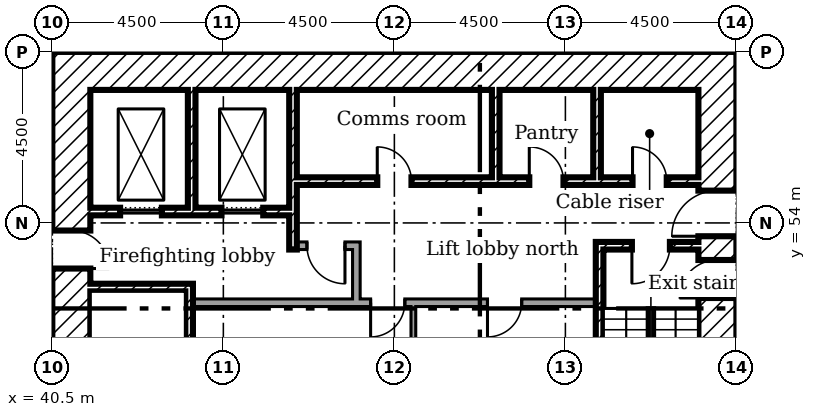
"""IFC4 building model, lengths in metres.
Left out: names, types, materials, properties, quantities, classifications, styles, units other than length and angle.
Written with IfcOpenShell. Run it as: python <this file> out.ifc"""

import sys

from ifc_helpers import new_model, si_unit, direction, frame, frame_2d, origin, place, context, subcontext, project, spatial, rectangle, extrude, element, fill, save


model = new_model("IFC4")
c1 = context("Model", 3, precision=1e-05, world=origin(), true_north=direction((0.0, 1.0)))
c2 = subcontext(c1, "Body", "Model", "MODEL_VIEW")
j1 = project(units=[si_unit("LENGTHUNIT", "METRE"), si_unit("PLANEANGLEUNIT", "RADIAN")], contexts=[c1])
p1 = place(None, origin())
s1 = spatial("IfcSite", under=j1, at=p1, CompositionType="ELEMENT")
p2 = place(p1, origin())
s2 = spatial("IfcBuilding", under=s1, at=p2, CompositionType="ELEMENT")
p3 = place(p2, frame((0.0, 0.0, 11.5)))
s3 = spatial("IfcBuildingStorey", under=s2, at=p3, CompositionType="ELEMENT", Elevation=11.5)
p4 = place(p3, frame((58.0, 40.5, 0.0), z_axis=(0.0, 0.0, 1.0), x_axis=(0.0, 1.0, 0.0)))
e1 = element("IfcWall", 1, at=p4, inside=s3, PredefinedType="SHEAR", context=c2, shape_type="SweptSolid", body=[
    extrude(rectangle(XDim=18.0, YDim=1.0, at=frame_2d((9.0, 0.0))), origin(), (0.0, 0.0, 1.0), 4.5),
])
p5 = place(p4, frame((13.15, 0.0, 0.0)))
e2 = element("IfcOpeningElement", 2, at=p5, cuts=e1, PredefinedType="OPENING", context=c2, shape_type="SweptSolid", body=[
    extrude(rectangle(XDim=1.2, YDim=2.1, at=frame_2d((0.6, 1.05))), frame((0.0, 0.51, 0.0), z_axis=(0.0, -1.0, 0.0), x_axis=(1.0, 0.0, 0.0)), (0.0, 0.0, 1.0), 1.02),
])
p6 = place(p4, frame((3.9, 0.0, 0.0)))
e3 = element("IfcOpeningElement", 3, at=p6, cuts=e1, PredefinedType="OPENING", context=c2, shape_type="SweptSolid", body=[
    extrude(rectangle(XDim=1.8, YDim=2.1, at=frame_2d((0.9, 1.05))), frame((0.0, 0.51, 0.0), z_axis=(0.0, -1.0, 0.0), x_axis=(1.0, 0.0, 0.0)), (0.0, 0.0, 1.0), 1.02),
])
p7 = place(p4, frame((11.525, 0.0, 0.0)))
e4 = element("IfcOpeningElement", 4, at=p7, cuts=e1, PredefinedType="OPENING", context=c2, shape_type="SweptSolid", body=[
    extrude(rectangle(XDim=1.0, YDim=2.1, at=frame_2d((0.5, 1.05))), frame((0.0, 0.51, 0.0), z_axis=(0.0, -1.0, 0.0), x_axis=(1.0, 0.0, 0.0)), (0.0, 0.0, 1.0), 1.02),
])
p8 = place(p3, frame((41.5, 58.0, 0.0)))
e5 = element("IfcWall", 5, at=p8, inside=s3, PredefinedType="SHEAR", context=c2, shape_type="SweptSolid", body=[
    extrude(rectangle(XDim=16.0, YDim=1.0, at=frame_2d((8.0, 0.0))), origin(), (0.0, 0.0, 1.0), 4.5),
])
p9 = place(p3, frame((41.0, 40.5, 0.0), z_axis=(0.0, 0.0, 1.0), x_axis=(0.0, 1.0, 0.0)))
e6 = element("IfcWall", 6, at=p9, inside=s3, PredefinedType="SHEAR", context=c2, shape_type="SweptSolid", body=[
    extrude(rectangle(XDim=18.0, YDim=1.0, at=frame_2d((9.0, 0.0))), origin(), (0.0, 0.0, 1.0), 4.5),
])
p10 = place(p9, frame((3.65, 0.0, 0.0)))
e7 = element("IfcOpeningElement", 7, at=p10, cuts=e6, PredefinedType="OPENING", context=c2, shape_type="SweptSolid", body=[
    extrude(rectangle(XDim=1.2, YDim=2.1, at=frame_2d((0.6, 1.05))), frame((0.0, 0.51, 0.0), z_axis=(0.0, -1.0, 0.0), x_axis=(1.0, 0.0, 0.0)), (0.0, 0.0, 1.0), 1.02),
])
p11 = place(p9, frame((5.475, 0.0, 0.0)))
e8 = element("IfcOpeningElement", 8, at=p11, cuts=e6, PredefinedType="OPENING", context=c2, shape_type="SweptSolid", body=[
    extrude(rectangle(XDim=1.0, YDim=2.1, at=frame_2d((0.5, 1.05))), frame((0.0, 0.51, 0.0), z_axis=(0.0, -1.0, 0.0), x_axis=(1.0, 0.0, 0.0)), (0.0, 0.0, 1.0), 1.02),
])
p12 = place(p9, frame((12.3, 0.0, 0.0)))
e9 = element("IfcOpeningElement", 9, at=p12, cuts=e6, PredefinedType="OPENING", context=c2, shape_type="SweptSolid", body=[
    extrude(rectangle(XDim=1.0, YDim=2.1, at=frame_2d((0.5, 1.05))), frame((0.0, 0.51, 0.0), z_axis=(0.0, -1.0, 0.0), x_axis=(1.0, 0.0, 0.0)), (0.0, 0.0, 1.0), 1.02),
])
p13 = place(p3, frame((44.167, 57.5, 0.0), z_axis=(0.0, 0.0, 1.0), x_axis=(0.0, -1.0, 0.0)))
e10 = element("IfcWall", 10, at=p13, inside=s3, PredefinedType="SHEAR", context=c2, shape_type="SweptSolid", body=[
    extrude(rectangle(XDim=3.1, YDim=0.2, at=frame_2d((1.55, 0.0))), origin(), (0.0, 0.0, 1.0), 4.5),
])
p14 = place(p3, frame((46.833, 57.5, 0.0), z_axis=(0.0, 0.0, 1.0), x_axis=(0.0, -1.0, 0.0)))
e11 = element("IfcWall", 11, at=p14, inside=s3, PredefinedType="SHEAR", context=c2, shape_type="SweptSolid", body=[
    extrude(rectangle(XDim=4.2, YDim=0.2, at=frame_2d((2.1, 0.0))), origin(), (0.0, 0.0, 1.0), 4.5),
])
for number, where, z_axis, x_axis in (
    (12, (52.167, 57.5, 0.0), (0.0, 0.0, 1.0), (0.0, -1.0, 0.0)),
    (13, (54.833, 57.5, 0.0), (0.0, 0.0, 1.0), (0.0, -1.0, 0.0)),
):
    element("IfcWall", number, at=place(p3, frame(where, z_axis=z_axis, x_axis=x_axis)), inside=s3, PredefinedType="SHEAR", context=c2, shape_type="SweptSolid", body=[
        extrude(rectangle(XDim=2.3, YDim=0.2, at=frame_2d((1.15, 0.0))), origin(), (0.0, 0.0, 1.0), 4.5),
    ])
p15 = place(p3, frame((48.5, 51.9, 0.0), z_axis=(0.0, 0.0, 1.0), x_axis=(0.0, 1.0, 0.0)))
e14 = element("IfcWall", 14, at=p15, inside=s3, PredefinedType="PARTITIONING", context=c2, shape_type="SweptSolid", body=[
    extrude(rectangle(XDim=1.6, YDim=0.2, at=frame_2d((0.8, 0.0))), origin(), (0.0, 0.0, 1.0), 4.5),
])
p16 = place(p3, frame((46.933, 53.4, 0.0)))
e15 = element("IfcWall", 15, at=p16, inside=s3, PredefinedType="PARTITIONING", context=c2, shape_type="SweptSolid", body=[
    extrude(rectangle(XDim=1.467, YDim=0.2, at=frame_2d((0.733, 0.0))), origin(), (0.0, 0.0, 1.0), 4.5),
])
p17 = place(p16, frame((0.267, 0.0, 0.0)))
e16 = element("IfcOpeningElement", 16, at=p17, cuts=e15, PredefinedType="OPENING", context=c2, shape_type="SweptSolid", body=[
    extrude(rectangle(XDim=1.0, YDim=2.1, at=frame_2d((0.5, 1.05))), frame((0.0, 0.11, 0.0), z_axis=(0.0, -1.0, 0.0), x_axis=(1.0, 0.0, 0.0)), (0.0, 0.0, 1.0), 0.22),
])
p18 = place(p3, frame((46.933, 55.1, 0.0)))
e17 = element("IfcWall", 17, at=p18, inside=s3, PredefinedType="SHEAR", context=c2, shape_type="SweptSolid", body=[
    extrude(rectangle(XDim=10.567, YDim=0.2, at=frame_2d((5.283, 0.0))), origin(), (0.0, 0.0, 1.0), 4.5),
])
p19 = place(p18, frame((8.833, 0.0, 0.0)))
e18 = element("IfcOpeningElement", 18, at=p19, cuts=e17, PredefinedType="OPENING", context=c2, shape_type="SweptSolid", body=[
    extrude(rectangle(XDim=0.9, YDim=2.1, at=frame_2d((0.45, 1.05))), frame((0.0, 0.11, 0.0), z_axis=(0.0, -1.0, 0.0), x_axis=(1.0, 0.0, 0.0)), (0.0, 0.0, 1.0), 0.22),
])
p20 = place(p18, frame((2.117, 0.0, 0.0)))
e19 = element("IfcOpeningElement", 19, at=p20, cuts=e17, PredefinedType="OPENING", context=c2, shape_type="SweptSolid", body=[
    extrude(rectangle(XDim=0.9, YDim=2.1, at=frame_2d((0.45, 1.05))), frame((0.0, 0.11, 0.0), z_axis=(0.0, -1.0, 0.0), x_axis=(1.0, 0.0, 0.0)), (0.0, 0.0, 1.0), 0.22),
])
p21 = place(p18, frame((6.117, 0.0, 0.0)))
e20 = element("IfcOpeningElement", 20, at=p21, cuts=e17, PredefinedType="OPENING", context=c2, shape_type="SweptSolid", body=[
    extrude(rectangle(XDim=0.9, YDim=2.1, at=frame_2d((0.45, 1.05))), frame((0.0, 0.11, 0.0), z_axis=(0.0, -1.0, 0.0), x_axis=(1.0, 0.0, 0.0)), (0.0, 0.0, 1.0), 0.22),
])
p22 = place(p3, frame((41.5, 54.3, 0.0)))
e21 = element("IfcWall", 21, at=p22, inside=s3, PredefinedType="SHEAR", context=c2, shape_type="SweptSolid", body=[
    extrude(rectangle(XDim=5.233, YDim=0.2, at=frame_2d((2.617, 0.0))), origin(), (0.0, 0.0, 1.0), 4.5),
])
p23 = place(p22, frame((0.783, 0.0, 0.0)))
e22 = element("IfcOpeningElement", 22, at=p23, cuts=e21, PredefinedType="OPENING", context=c2, shape_type="SweptSolid", body=[
    extrude(rectangle(XDim=1.1, YDim=2.1, at=frame_2d((0.55, 1.05))), frame((0.0, 0.11, 0.0), z_axis=(0.0, -1.0, 0.0), x_axis=(1.0, 0.0, 0.0)), (0.0, 0.0, 1.0), 0.22),
])
p24 = place(p22, frame((3.45, 0.0, 0.0)))
e23 = element("IfcOpeningElement", 23, at=p24, cuts=e21, PredefinedType="OPENING", context=c2, shape_type="SweptSolid", body=[
    extrude(rectangle(XDim=1.1, YDim=2.1, at=frame_2d((0.55, 1.05))), frame((0.0, 0.11, 0.0), z_axis=(0.0, -1.0, 0.0), x_axis=(1.0, 0.0, 0.0)), (0.0, 0.0, 1.0), 0.22),
])
p25 = place(p3, frame((44.1, 45.5, 0.0), z_axis=(0.0, 0.0, 1.0), x_axis=(0.0, 1.0, 0.0)))
e24 = element("IfcWall", 24, at=p25, inside=s3, PredefinedType="SHEAR", context=c2, shape_type="SweptSolid", body=[
    extrude(rectangle(XDim=6.9, YDim=0.2, at=frame_2d((3.45, 0.0))), origin(), (0.0, 0.0, 1.0), 4.5),
])
p26 = place(p3, frame((41.5, 52.3, 0.0)))
e25 = element("IfcWall", 25, at=p26, inside=s3, PredefinedType="SHEAR", context=c2, shape_type="SweptSolid", body=[
    extrude(rectangle(XDim=2.5, YDim=0.2, at=frame_2d((1.25, 0.0))), origin(), (0.0, 0.0, 1.0), 4.5),
])
p27 = place(p3, frame((54.8, 53.4, 0.0)))
e26 = element("IfcWall", 26, at=p27, inside=s3, PredefinedType="SHEAR", context=c2, shape_type="SweptSolid", body=[
    extrude(rectangle(XDim=2.7, YDim=0.2, at=frame_2d((1.35, 0.0))), origin(), (0.0, 0.0, 1.0), 4.5),
])
p28 = place(p27, frame((0.95, 0.0, 0.0)))
e27 = element("IfcOpeningElement", 27, at=p28, cuts=e26, PredefinedType="OPENING", context=c2, shape_type="SweptSolid", body=[
    extrude(rectangle(XDim=1.0, YDim=2.1, at=frame_2d((0.5, 1.05))), frame((0.0, 0.11, 0.0), z_axis=(0.0, -1.0, 0.0), x_axis=(1.0, 0.0, 0.0)), (0.0, 0.0, 1.0), 0.22),
])
p29 = place(p3, frame((54.9, 46.8, 0.0), z_axis=(0.0, 0.0, 1.0), x_axis=(0.0, 1.0, 0.0)))
e28 = element("IfcWall", 28, at=p29, inside=s3, PredefinedType="SHEAR", context=c2, shape_type="SweptSolid", body=[
    extrude(rectangle(XDim=6.5, YDim=0.2, at=frame_2d((3.25, 0.0))), origin(), (0.0, 0.0, 1.0), 4.5),
])
p30 = place(p3, frame((44.2, 51.9, 0.0)))
e29 = element("IfcWall", 29, at=p30, inside=s3, PredefinedType="PARTITIONING", context=c2, shape_type="SweptSolid", body=[
    extrude(rectangle(XDim=10.6, YDim=0.2, at=frame_2d((5.3, 0.0))), origin(), (0.0, 0.0, 1.0), 4.5),
])
p31 = place(p30, frame((4.675, 0.0, 0.0)))
e30 = element("IfcOpeningElement", 30, at=p31, cuts=e29, PredefinedType="OPENING", context=c2, shape_type="SweptSolid", body=[
    extrude(rectangle(XDim=0.9, YDim=2.1, at=frame_2d((0.45, 1.05))), frame((0.0, 0.11, 0.0), z_axis=(0.0, -1.0, 0.0), x_axis=(1.0, 0.0, 0.0)), (0.0, 0.0, 1.0), 0.22),
])
p32 = place(p30, frame((7.75, 0.0, 0.0)))
e31 = element("IfcOpeningElement", 31, at=p32, cuts=e29, PredefinedType="OPENING", context=c2, shape_type="SweptSolid", body=[
    extrude(rectangle(XDim=0.9, YDim=2.1, at=frame_2d((0.45, 1.05))), frame((0.0, 0.11, 0.0), z_axis=(0.0, -1.0, 0.0), x_axis=(1.0, 0.0, 0.0)), (0.0, 0.0, 1.0), 0.22),
])
p33 = place(p3, frame((50.0, 49.163, 0.0), z_axis=(0.0, 0.0, 1.0), x_axis=(0.0, 1.0, 0.0)))
e32 = element("IfcWall", 32, at=p33, inside=s3, PredefinedType="PARTITIONING", context=c2, shape_type="SweptSolid", body=[
    extrude(rectangle(XDim=2.637, YDim=0.125, at=frame_2d((1.319, 0.0))), origin(), (0.0, 0.0, 1.0), 4.5),
])
p34 = place(p5, origin())
e33 = element("IfcDoor", 33, at=p34, inside=s3, OperationType="SINGLE_SWING_RIGHT", PredefinedType="DOOR", context=c2, shape_type="SweptSolid", body=[
    extrude(rectangle(XDim=1.2, YDim=2.1, at=frame_2d((0.6, 1.05))), frame((0.0, 0.025, 0.0), z_axis=(0.0, -1.0, 0.0), x_axis=(1.0, 0.0, 0.0)), (0.0, 0.0, 1.0), 0.05),
])
fill(e2, e33)
p35 = place(p28, frame((1.0, 0.0, 0.0), x_axis=(-1.0, 0.0, 0.0)))
e34 = element("IfcDoor", 34, at=p35, inside=s3, OperationType="SINGLE_SWING_LEFT", PredefinedType="DOOR", context=c2, shape_type="SweptSolid", body=[
    extrude(rectangle(XDim=1.0, YDim=2.1, at=frame_2d((0.5, 1.05))), frame((0.0, 0.025, 0.0), z_axis=(0.0, -1.0, 0.0), x_axis=(1.0, 0.0, 0.0)), (0.0, 0.0, 1.0), 0.05),
])
fill(e27, e34)
p36 = place(p7, origin())
e35 = element("IfcDoor", 35, at=p36, inside=s3, OperationType="SINGLE_SWING_RIGHT", PredefinedType="DOOR", context=c2, shape_type="SweptSolid", body=[
    extrude(rectangle(XDim=1.0, YDim=2.1, at=frame_2d((0.5, 1.05))), frame((0.0, 0.025, 0.0), z_axis=(0.0, -1.0, 0.0), x_axis=(1.0, 0.0, 0.0)), (0.0, 0.0, 1.0), 0.05),
])
fill(e4, e35)
p37 = place(p17, frame((1.0, 0.0, 0.0), x_axis=(-1.0, 0.0, 0.0)))
e36 = element("IfcDoor", 36, at=p37, inside=s3, OperationType="SINGLE_SWING_RIGHT", PredefinedType="DOOR", context=c2, shape_type="SweptSolid", body=[
    extrude(rectangle(XDim=1.0, YDim=2.1, at=frame_2d((0.5, 1.05))), frame((0.0, 0.025, 0.0), z_axis=(0.0, -1.0, 0.0), x_axis=(1.0, 0.0, 0.0)), (0.0, 0.0, 1.0), 0.05),
])
fill(e16, e36)
p38 = place(p12, frame((1.0, 0.0, 0.0), x_axis=(-1.0, 0.0, 0.0)))
e37 = element("IfcDoor", 37, at=p38, inside=s3, OperationType="SINGLE_SWING_LEFT", PredefinedType="DOOR", context=c2, shape_type="SweptSolid", body=[
    extrude(rectangle(XDim=1.0, YDim=2.1, at=frame_2d((0.5, 1.05))), frame((0.0, 0.025, 0.0), z_axis=(0.0, -1.0, 0.0), x_axis=(1.0, 0.0, 0.0)), (0.0, 0.0, 1.0), 0.05),
])
fill(e9, e37)
p39 = place(p19, origin())
e38 = element("IfcDoor", 38, at=p39, inside=s3, OperationType="SINGLE_SWING_RIGHT", PredefinedType="DOOR", context=c2, shape_type="SweptSolid", body=[
    extrude(rectangle(XDim=0.9, YDim=2.1, at=frame_2d((0.45, 1.05))), frame((0.0, 0.025, 0.0), z_axis=(0.0, -1.0, 0.0), x_axis=(1.0, 0.0, 0.0)), (0.0, 0.0, 1.0), 0.05),
])
fill(e18, e38)
p40 = place(p20, origin())
e39 = element("IfcDoor", 39, at=p40, inside=s3, OperationType="SINGLE_SWING_RIGHT", PredefinedType="DOOR", context=c2, shape_type="SweptSolid", body=[
    extrude(rectangle(XDim=0.9, YDim=2.1, at=frame_2d((0.45, 1.05))), frame((0.0, 0.025, 0.0), z_axis=(0.0, -1.0, 0.0), x_axis=(1.0, 0.0, 0.0)), (0.0, 0.0, 1.0), 0.05),
])
fill(e19, e39)
p41 = place(p21, origin())
e40 = element("IfcDoor", 40, at=p41, inside=s3, OperationType="SINGLE_SWING_RIGHT", PredefinedType="DOOR", context=c2, shape_type="SweptSolid", body=[
    extrude(rectangle(XDim=0.9, YDim=2.1, at=frame_2d((0.45, 1.05))), frame((0.0, 0.025, 0.0), z_axis=(0.0, -1.0, 0.0), x_axis=(1.0, 0.0, 0.0)), (0.0, 0.0, 1.0), 0.05),
])
fill(e20, e40)
p42 = place(p31, frame((0.9, 0.0, 0.0), x_axis=(-1.0, 0.0, 0.0)))
e41 = element("IfcDoor", 41, at=p42, inside=s3, OperationType="SINGLE_SWING_LEFT", PredefinedType="DOOR", context=c2, shape_type="SweptSolid", body=[
    extrude(rectangle(XDim=0.9, YDim=2.1, at=frame_2d((0.45, 1.05))), frame((0.0, 0.025, 0.0), z_axis=(0.0, -1.0, 0.0), x_axis=(1.0, 0.0, 0.0)), (0.0, 0.0, 1.0), 0.05),
])
fill(e30, e41)
p43 = place(p32, frame((0.9, 0.0, 0.0), x_axis=(-1.0, 0.0, 0.0)))
e42 = element("IfcDoor", 42, at=p43, inside=s3, OperationType="SINGLE_SWING_LEFT", PredefinedType="DOOR", context=c2, shape_type="SweptSolid", body=[
    extrude(rectangle(XDim=0.9, YDim=2.1, at=frame_2d((0.45, 1.05))), frame((0.0, 0.025, 0.0), z_axis=(0.0, -1.0, 0.0), x_axis=(1.0, 0.0, 0.0)), (0.0, 0.0, 1.0), 0.05),
])
fill(e31, e42)
p44 = place(p23, origin())
e43 = element("IfcDoor", 43, at=p44, inside=s3, OperationType="SLIDING_TO_LEFT", PredefinedType="DOOR", context=c2, shape_type="SweptSolid", body=[
    extrude(rectangle(XDim=1.1, YDim=2.1, at=frame_2d((0.55, 1.05))), frame((0.0, 0.025, 0.0), z_axis=(0.0, -1.0, 0.0), x_axis=(1.0, 0.0, 0.0)), (0.0, 0.0, 1.0), 0.05),
])
fill(e22, e43)
p45 = place(p24, origin())
e44 = element("IfcDoor", 44, at=p45, inside=s3, OperationType="SLIDING_TO_LEFT", PredefinedType="DOOR", context=c2, shape_type="SweptSolid", body=[
    extrude(rectangle(XDim=1.1, YDim=2.1, at=frame_2d((0.55, 1.05))), frame((0.0, 0.025, 0.0), z_axis=(0.0, -1.0, 0.0), x_axis=(1.0, 0.0, 0.0)), (0.0, 0.0, 1.0), 0.05),
])
fill(e23, e44)
save(model, sys.argv[1])
